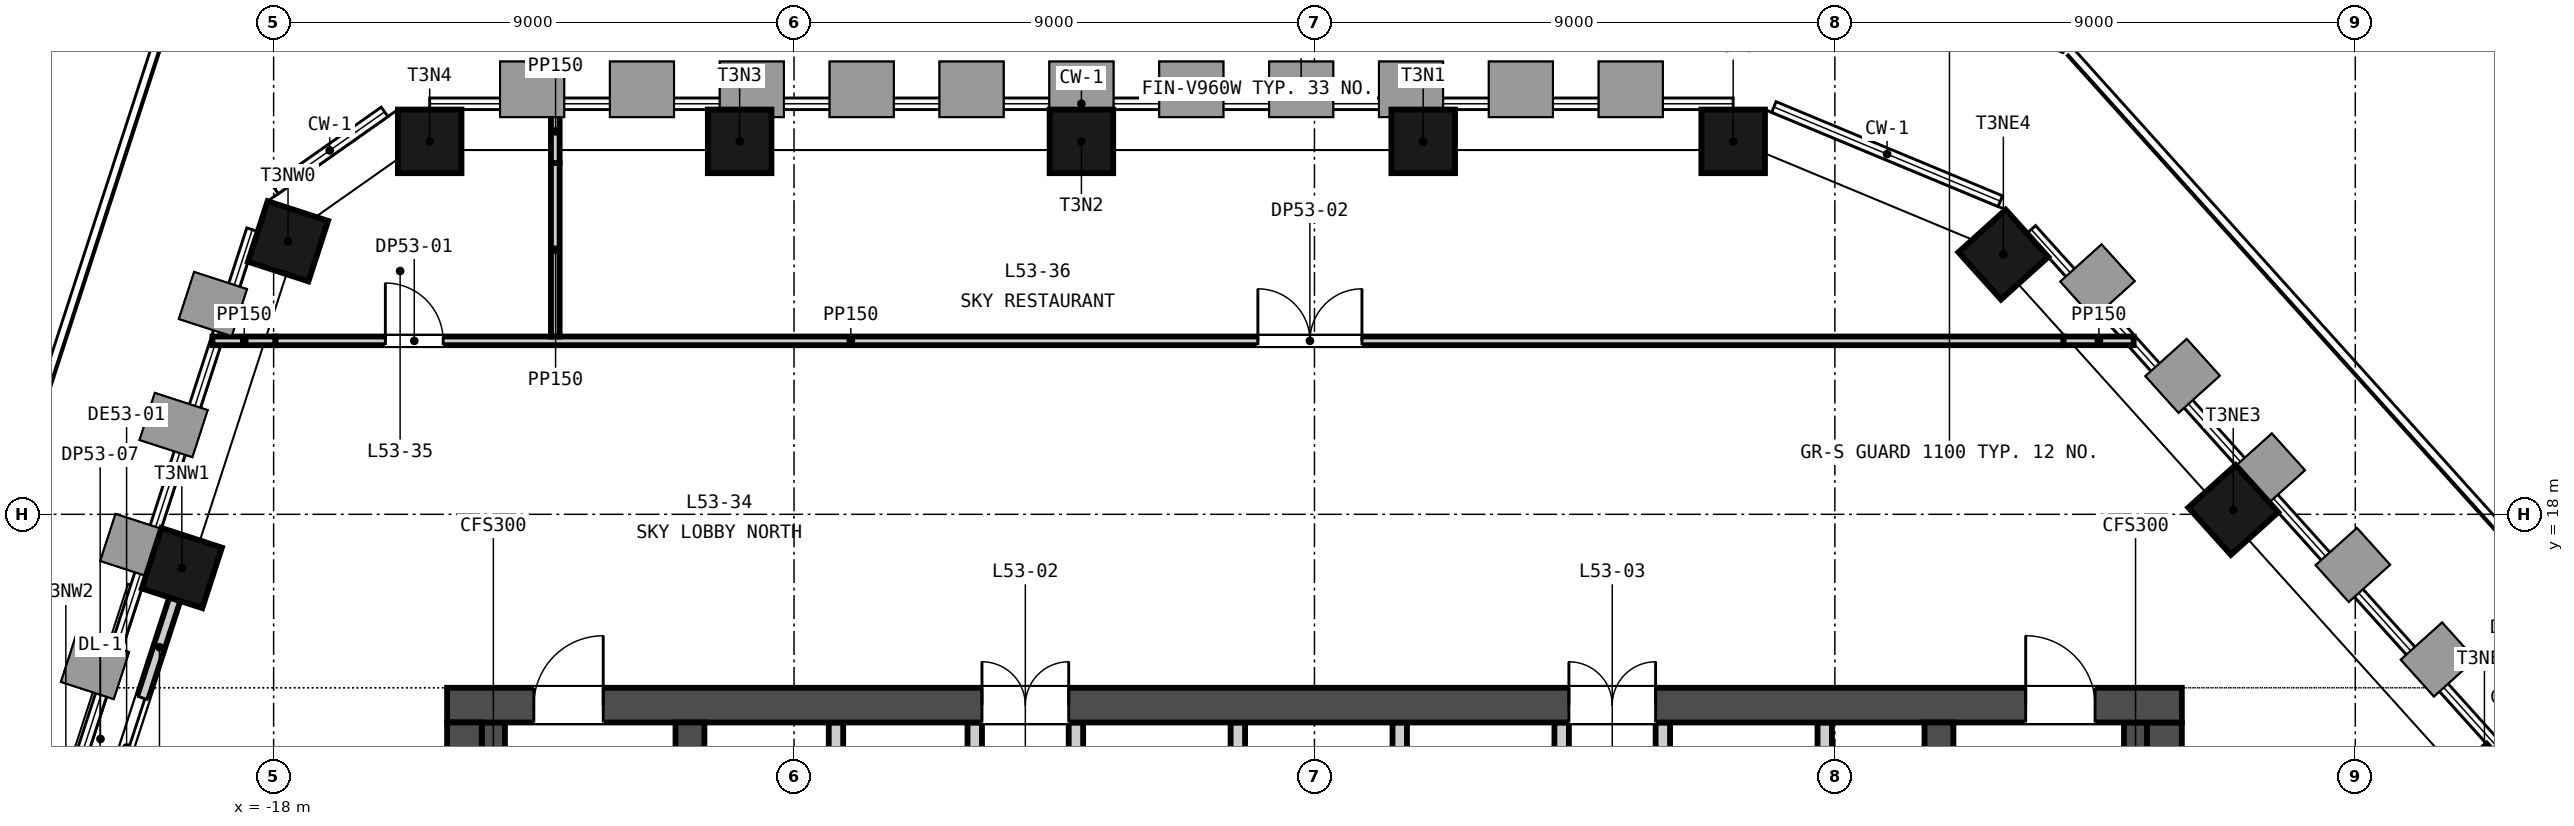
"""IFC4 building model, lengths in metres.
Left out: names, types, materials, properties, quantities, classifications, styles, units other than length and angle.
Written with IfcOpenShell. Run it as: python <this file> out.ifc"""

import sys

from ifc_helpers import new_model, si_unit, direction, frame, frame_2d, origin, origin_2d, place, context, subcontext, project, spatial, rectangle, extrude, element, fill, save


model = new_model("IFC4")
c1 = context("Model", 3, precision=1e-05, world=origin(), true_north=direction((0.0, 1.0)))
c2 = subcontext(c1, "Body", "Model", "MODEL_VIEW")
j1 = project(units=[si_unit("LENGTHUNIT", "METRE"), si_unit("PLANEANGLEUNIT", "RADIAN")], contexts=[c1])
p1 = place(None, origin())
s1 = spatial("IfcSite", under=j1, at=p1, CompositionType="ELEMENT")
p2 = place(p1, origin())
s2 = spatial("IfcBuilding", under=s1, at=p2, CompositionType="ELEMENT")
p3 = place(p2, frame((0.0, 0.0, 211.8)))
s3 = spatial("IfcBuildingStorey", under=s2, at=p3, CompositionType="ELEMENT", Elevation=211.8)
p4 = place(p3, frame((-15.0, 14.7, -0.3), z_axis=(0.0, 0.0, 1.0), x_axis=(1.0, 0.0, 0.0)))
e1 = element("IfcWall", 1, at=p4, inside=s3, PredefinedType="SOLIDWALL", context=c2, shape_type="SweptSolid", body=[
    extrude(rectangle(XDim=30.0, YDim=0.6, at=frame_2d((15.0, 0.0))), origin(), (0.0, 0.0, 1.0), 4.65),
])
p5 = place(p4, frame((9.25, 0.0, 0.3)))
e2 = element("IfcOpeningElement", 2, at=p5, cuts=e1, PredefinedType="OPENING", context=c2, shape_type="SweptSolid", body=[
    extrude(rectangle(XDim=1.5, YDim=2.1, at=frame_2d((0.75, 1.05))), frame((0.0, 0.31, 0.0), z_axis=(0.0, -1.0, 0.0), x_axis=(1.0, 0.0, 0.0)), (0.0, 0.0, 1.0), 0.62),
])
p6 = place(p4, frame((19.4, 0.0, 0.3)))
e3 = element("IfcOpeningElement", 3, at=p6, cuts=e1, PredefinedType="OPENING", context=c2, shape_type="SweptSolid", body=[
    extrude(rectangle(XDim=1.5, YDim=2.1, at=frame_2d((0.75, 1.05))), frame((0.0, 0.31, 0.0), z_axis=(0.0, -1.0, 0.0), x_axis=(1.0, 0.0, 0.0)), (0.0, 0.0, 1.0), 0.62),
])
p7 = place(p4, frame((1.5, 0.0, 0.3)))
e4 = element("IfcOpeningElement", 4, at=p7, cuts=e1, PredefinedType="OPENING", context=c2, shape_type="SweptSolid", body=[
    extrude(rectangle(XDim=1.2, YDim=2.1, at=frame_2d((0.6, 1.05))), frame((0.0, 0.31, 0.0), z_axis=(0.0, -1.0, 0.0), x_axis=(1.0, 0.0, 0.0)), (0.0, 0.0, 1.0), 0.62),
])
p8 = place(p4, frame((27.3, 0.0, 0.3)))
e5 = element("IfcOpeningElement", 5, at=p8, cuts=e1, PredefinedType="OPENING", context=c2, shape_type="SweptSolid", body=[
    extrude(rectangle(XDim=1.2, YDim=2.1, at=frame_2d((0.6, 1.05))), frame((0.0, 0.31, 0.0), z_axis=(0.0, -1.0, 0.0), x_axis=(1.0, 0.0, 0.0)), (0.0, 0.0, 1.0), 0.62),
])
for number, where, z_axis, x_axis in (
    (6, (-14.7, 0.6, -0.3), (0.0, 0.0, 1.0), (0.0, 1.0, 0.0)),
    (7, (14.7, 0.6, -0.3), (0.0, 0.0, 1.0), (0.0, 1.0, 0.0)),
):
    element("IfcWall", number, at=place(p3, frame(where, z_axis=z_axis, x_axis=x_axis)), inside=s3, PredefinedType="SOLIDWALL", context=c2, shape_type="SweptSolid", body=[
        extrude(rectangle(XDim=13.8, YDim=0.6, at=frame_2d((6.9, 0.0))), origin(), (0.0, 0.0, 1.0), 4.65),
    ])
for number, where, z_axis, x_axis in (
    (8, (-10.8, 0.6, -0.3), (0.0, 0.0, 1.0), (0.0, 1.0, 0.0)),
    (9, (10.8, 0.6, -0.3), (0.0, 0.0, 1.0), (0.0, 1.0, 0.0)),
):
    element("IfcWall", number, at=place(p3, frame(where, z_axis=z_axis, x_axis=x_axis)), inside=s3, PredefinedType="SOLIDWALL", context=c2, shape_type="SweptSolid", body=[
        extrude(rectangle(XDim=13.8, YDim=0.5, at=frame_2d((6.9, 0.0))), origin(), (0.0, 0.0, 1.0), 4.65),
    ])
for number, where, z_axis, x_axis in (
    (10, (7.241, 24.45, -0.3), (0.0, 0.0, 1.0), (-1.0, 0.0, 0.0)),
    (11, (1.881, 24.45, -0.3), (0.0, 0.0, 1.0), (-1.0, 0.0, 0.0)),
    (12, (-4.03, 24.45, -0.3), (0.0, 0.0, 1.0), (-1.0, 0.0, 0.0)),
    (13, (-9.941, 24.45, -0.3), (0.0, 0.0, 1.0), (-1.0, 0.0, 0.0)),
    (14, (-15.301, 24.45, -0.3), (0.0, 0.0, 1.0), (-1.0, 0.0, 0.0)),
    (15, (-17.751, 22.722, -0.3), (0.0, 0.0, 1.0), (-0.309, -0.951, 0.0)),
    (16, (-19.587, 17.071, -0.3), (0.0, 0.0, 1.0), (-0.309, -0.951, 0.0)),
    (17, (20.233, 13.252, -0.3), (0.0, 0.0, 1.0), (-0.669, 0.743, 0.0)),
    (18, (15.89, 18.076, -0.3), (0.0, 0.0, 1.0), (-0.669, 0.743, 0.0)),
    (19, (11.914, 22.492, -0.3), (0.0, 0.0, 1.0), (-0.669, 0.743, 0.0)),
):
    element("IfcColumn", number, at=place(p3, frame(where, z_axis=z_axis, x_axis=x_axis)), inside=s3, PredefinedType="COLUMN", context=c2, shape_type="SweptSolid", body=[
        extrude(rectangle(XDim=1.1, YDim=1.1, at=origin_2d()), origin(), (0.0, 0.0, 1.0), 4.65),
    ])
p9 = place(p3, frame((-19.709, 16.532, 0.0), z_axis=(0.0, 0.0, 1.0), x_axis=(-0.309032831924, -0.951051370218, 0.0)))
e20 = element("IfcWall", 20, at=p9, inside=s3, PredefinedType="SOLIDWALL", context=c2, shape_type="SweptSolid", body=[
    extrude(rectangle(XDim=5.392, YDim=0.2, at=frame_2d((2.696, 0.0))), origin(), (0.0, 0.0, 1.0), 3.7),
])
p10 = place(p9, frame((1.796, 0.0, 0.0)))
e21 = element("IfcOpeningElement", 21, at=p10, cuts=e20, PredefinedType="OPENING", context=c2, shape_type="SweptSolid", body=[
    extrude(rectangle(XDim=1.8, YDim=2.4, at=frame_2d((0.9, 1.2))), frame((0.0, 0.11, 0.0), z_axis=(0.0, -1.0, 0.0), x_axis=(1.0, 0.0, 0.0)), (0.0, 0.0, 1.0), 0.22),
])
for number, where, z_axis, x_axis in (
    (22, (-8.275, 11.3, 0.0), (0.0, 0.0, 1.0), (0.0, 1.0, 0.0)),
    (23, (-5.875, 11.3, 0.0), (0.0, 0.0, 1.0), (0.0, 1.0, 0.0)),
    (24, (-4.125, 11.3, 0.0), (0.0, 0.0, 1.0), (0.0, 1.0, 0.0)),
    (25, (-1.325, 11.3, 0.0), (0.0, 0.0, 1.0), (0.0, 1.0, 0.0)),
    (26, (1.475, 11.3, 0.0), (0.0, 0.0, 1.0), (0.0, 1.0, 0.0)),
    (27, (4.275, 11.3, 0.0), (0.0, 0.0, 1.0), (0.0, 1.0, 0.0)),
    (28, (6.025, 11.3, 0.0), (0.0, 0.0, 1.0), (0.0, 1.0, 0.0)),
    (29, (8.825, 11.3, 0.0), (0.0, 0.0, 1.0), (0.0, 1.0, 0.0)),
):
    element("IfcWall", number, at=place(p3, frame(where, z_axis=z_axis, x_axis=x_axis)), inside=s3, PredefinedType="PARTITIONING", context=c2, shape_type="SweptSolid", body=[
        extrude(rectangle(XDim=3.1, YDim=0.25, at=frame_2d((1.55, 0.0))), origin(), (0.0, 0.0, 1.0), 4.35),
    ])
for number, where, z_axis, x_axis in (
    (30, (-14.2, 0.6, 0.0), (0.0, 0.0, 1.0), (0.0, 1.0, 0.0)),
    (31, (14.2, 0.6, 0.0), (0.0, 0.0, 1.0), (0.0, 1.0, 0.0)),
):
    element("IfcWall", number, at=place(p3, frame(where, z_axis=z_axis, x_axis=x_axis)), inside=s3, PredefinedType="SOLIDWALL", context=c2, shape_type="SweptSolid", body=[
        extrude(rectangle(XDim=13.8, YDim=0.4, at=frame_2d((6.9, 0.0))), origin(), (0.0, 0.0, 1.0), 4.35),
    ])
p11 = place(p3, frame((-19.059, 21.0, 0.0), z_axis=(0.0, 0.0, 1.0), x_axis=(1.0, 0.0, 0.0)))
e32 = element("IfcWall", 32, at=p11, inside=s3, PredefinedType="PARTITIONING", context=c2, shape_type="SweptSolid", body=[
    extrude(rectangle(XDim=1.091, YDim=0.15, at=frame_2d((0.545, 0.0))), origin(), (0.0, 0.0, 1.0), 3.7),
])
p12 = place(p3, frame((-17.968, 21.0, 0.0), z_axis=(0.0, 0.0, 1.0), x_axis=(1.0, 0.0, 0.0)))
e33 = element("IfcWall", 33, at=p12, inside=s3, PredefinedType="PARTITIONING", context=c2, shape_type="SweptSolid", body=[
    extrude(rectangle(XDim=30.922, YDim=0.15, at=frame_2d((15.461, 0.0))), origin(), (0.0, 0.0, 1.0), 4.35),
])
p13 = place(p12, frame((1.9, 0.0, 0.0)))
e34 = element("IfcOpeningElement", 34, at=p13, cuts=e33, PredefinedType="OPENING", context=c2, shape_type="SweptSolid", body=[
    extrude(rectangle(XDim=1.0, YDim=2.1, at=frame_2d((0.5, 1.05))), frame((0.0, 0.085, 0.0), z_axis=(0.0, -1.0, 0.0), x_axis=(1.0, 0.0, 0.0)), (0.0, 0.0, 1.0), 0.17),
])
p14 = place(p12, frame((16.989, 0.0, 0.0)))
e35 = element("IfcOpeningElement", 35, at=p14, cuts=e33, PredefinedType="OPENING", context=c2, shape_type="SweptSolid", body=[
    extrude(rectangle(XDim=1.8, YDim=2.4, at=frame_2d((0.9, 1.2))), frame((0.0, 0.085, 0.0), z_axis=(0.0, -1.0, 0.0), x_axis=(1.0, 0.0, 0.0)), (0.0, 0.0, 1.0), 0.17),
])
p15 = place(p3, frame((12.954, 21.0, 0.0), z_axis=(0.0, 0.0, 1.0), x_axis=(1.0, 0.0, 0.0)))
e36 = element("IfcWall", 36, at=p15, inside=s3, PredefinedType="PARTITIONING", context=c2, shape_type="SweptSolid", body=[
    extrude(rectangle(XDim=1.213, YDim=0.15, at=frame_2d((0.606, 0.0))), origin(), (0.0, 0.0, 1.0), 3.7),
])
p16 = place(p3, frame((-13.129, 21.075, 0.0), z_axis=(0.0, 0.0, 1.0), x_axis=(0.0, 1.0, 0.0)))
e37 = element("IfcWall", 37, at=p16, inside=s3, PredefinedType="PARTITIONING", context=c2, shape_type="SweptSolid", body=[
    extrude(rectangle(XDim=3.0, YDim=0.15, at=frame_2d((1.5, 0.0))), origin(), (0.0, 0.0, 1.0), 4.35),
])
p17 = place(p3, frame((-13.129, 24.075, 0.0), z_axis=(0.0, 0.0, 1.0), x_axis=(0.0, 1.0, 0.0)))
e38 = element("IfcWall", 38, at=p17, inside=s3, PredefinedType="PARTITIONING", context=c2, shape_type="SweptSolid", body=[
    extrude(rectangle(XDim=1.095, YDim=0.15, at=frame_2d((0.547, 0.0))), origin(), (0.0, 0.0, 1.0), 3.7),
])
p18 = place(p10, origin())
e39 = element("IfcDoor", 39, at=p18, inside=s3, OperationType="SINGLE_SWING_LEFT", PredefinedType="DOOR", context=c2, shape_type="SweptSolid", body=[
    extrude(rectangle(XDim=1.8, YDim=2.4, at=frame_2d((0.9, 1.2))), frame((0.0, 0.025, 0.0), z_axis=(0.0, -1.0, 0.0), x_axis=(1.0, 0.0, 0.0)), (0.0, 0.0, 1.0), 0.05),
])
fill(e21, e39)
p19 = place(p5, origin())
e40 = element("IfcDoor", 40, at=p19, inside=s3, OperationType="DOUBLE_DOOR_SINGLE_SWING", PredefinedType="DOOR", context=c2, shape_type="SweptSolid", body=[
    extrude(rectangle(XDim=1.5, YDim=2.1, at=frame_2d((0.75, 1.05))), frame((0.0, 0.025, 0.0), z_axis=(0.0, -1.0, 0.0), x_axis=(1.0, 0.0, 0.0)), (0.0, 0.0, 1.0), 0.05),
])
fill(e2, e40)
p20 = place(p6, origin())
e41 = element("IfcDoor", 41, at=p20, inside=s3, OperationType="DOUBLE_DOOR_SINGLE_SWING", PredefinedType="DOOR", context=c2, shape_type="SweptSolid", body=[
    extrude(rectangle(XDim=1.5, YDim=2.1, at=frame_2d((0.75, 1.05))), frame((0.0, 0.025, 0.0), z_axis=(0.0, -1.0, 0.0), x_axis=(1.0, 0.0, 0.0)), (0.0, 0.0, 1.0), 0.05),
])
fill(e3, e41)
p21 = place(p7, origin())
e42 = element("IfcDoor", 42, at=p21, inside=s3, OperationType="SINGLE_SWING_RIGHT", PredefinedType="DOOR", context=c2, shape_type="SweptSolid", body=[
    extrude(rectangle(XDim=1.2, YDim=2.1, at=frame_2d((0.6, 1.05))), frame((0.0, 0.025, 0.0), z_axis=(0.0, -1.0, 0.0), x_axis=(1.0, 0.0, 0.0)), (0.0, 0.0, 1.0), 0.05),
])
fill(e4, e42)
p22 = place(p8, origin())
e43 = element("IfcDoor", 43, at=p22, inside=s3, OperationType="SINGLE_SWING_LEFT", PredefinedType="DOOR", context=c2, shape_type="SweptSolid", body=[
    extrude(rectangle(XDim=1.2, YDim=2.1, at=frame_2d((0.6, 1.05))), frame((0.0, 0.025, 0.0), z_axis=(0.0, -1.0, 0.0), x_axis=(1.0, 0.0, 0.0)), (0.0, 0.0, 1.0), 0.05),
])
fill(e5, e43)
p23 = place(p13, origin())
e44 = element("IfcDoor", 44, at=p23, inside=s3, OperationType="SINGLE_SWING_LEFT", PredefinedType="DOOR", context=c2, shape_type="SweptSolid", body=[
    extrude(rectangle(XDim=1.0, YDim=2.1, at=frame_2d((0.5, 1.05))), frame((0.0, 0.025, 0.0), z_axis=(0.0, -1.0, 0.0), x_axis=(1.0, 0.0, 0.0)), (0.0, 0.0, 1.0), 0.05),
])
fill(e34, e44)
p24 = place(p14, origin())
e45 = element("IfcDoor", 45, at=p24, inside=s3, OperationType="SINGLE_SWING_LEFT", PredefinedType="DOOR", context=c2, shape_type="SweptSolid", body=[
    extrude(rectangle(XDim=1.8, YDim=2.4, at=frame_2d((0.9, 1.2))), frame((0.0, 0.025, 0.0), z_axis=(0.0, -1.0, 0.0), x_axis=(1.0, 0.0, 0.0)), (0.0, 0.0, 1.0), 0.05),
])
fill(e35, e45)
save(model, sys.argv[1])
